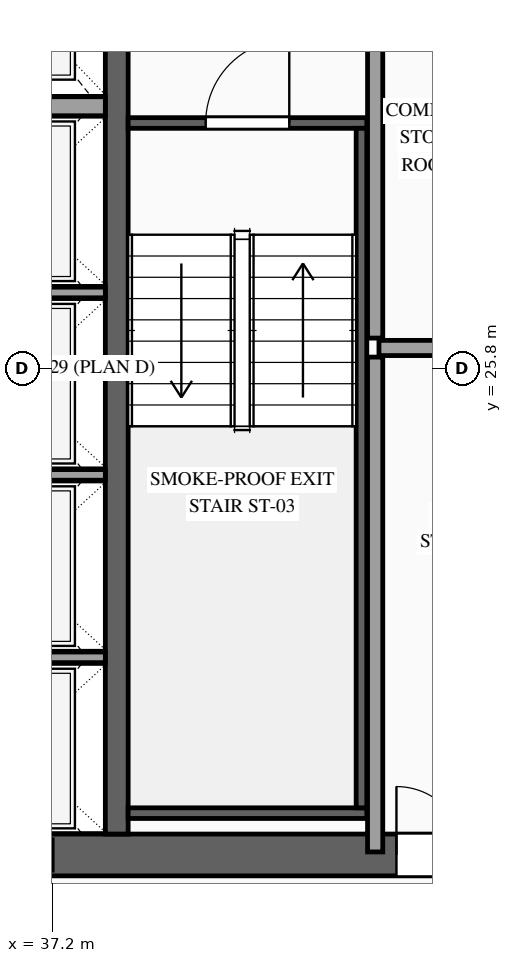
"""IFC4 building model, lengths in metres.
Left out: names, types, materials, properties, quantities, classifications, styles, units other than length and angle.
Written with IfcOpenShell. Run it as: python <this file> out.ifc"""

import sys

from ifc_helpers import new_model, si_unit, direction, frame, frame_2d, origin, place, context, subcontext, project, spatial, rectangle, extrude, source, transform, mapped, element, fill, save


model = new_model("IFC4")
c1 = context("Model", 3, precision=1e-05, world=origin(), true_north=direction((0.0, 1.0)))
c2 = subcontext(c1, "Body", "Model", "MODEL_VIEW")
j1 = project(units=[si_unit("LENGTHUNIT", "METRE"), si_unit("PLANEANGLEUNIT", "RADIAN")], contexts=[c1])
p1 = place(None, origin())
s1 = spatial("IfcSite", under=j1, at=p1, CompositionType="ELEMENT")
p2 = place(p1, origin())
s2 = spatial("IfcBuilding", under=s1, at=p2, CompositionType="ELEMENT")
p3 = place(p2, frame((0.0, 0.0, 241.6)))
s3 = spatial("IfcBuildingStorey", under=s2, at=p3, CompositionType="ELEMENT", Elevation=241.6)
p4 = place(p3, frame((23.525, 19.4, 0.0), z_axis=(0.0, 0.0, 1.0), x_axis=(1.0, 0.0, 0.0)))
e1 = element("IfcWall", 1, at=p4, inside=s3, PredefinedType="SHEAR", context=c2, shape_type="SweptSolid", body=[
    extrude(rectangle(XDim=26.95, YDim=0.55, at=frame_2d((13.475, 0.0))), origin(), (0.0, 0.0, 1.0), 3.5),
])
p5 = place(p4, frame((1.925, 0.0, 0.0)))
e2 = element("IfcOpeningElement", 2, at=p5, cuts=e1, PredefinedType="OPENING", context=c2, shape_type="SweptSolid", body=[
    extrude(rectangle(XDim=1.1, YDim=2.2, at=frame_2d((0.55, 1.1))), frame((0.0, 0.29, 0.0), z_axis=(0.0, -1.0, 0.0), x_axis=(1.0, 0.0, 0.0)), (0.0, 0.0, 1.0), 0.58),
])
p6 = place(p4, frame((9.825, 0.0, 0.0)))
e3 = element("IfcOpeningElement", 3, at=p6, cuts=e1, PredefinedType="OPENING", context=c2, shape_type="SweptSolid", body=[
    extrude(rectangle(XDim=1.1, YDim=2.2, at=frame_2d((0.55, 1.1))), frame((0.0, 0.29, 0.0), z_axis=(0.0, -1.0, 0.0), x_axis=(1.0, 0.0, 0.0)), (0.0, 0.0, 1.0), 0.58),
])
p7 = place(p4, frame((23.025, 0.0, 0.0)))
e4 = element("IfcOpeningElement", 4, at=p7, cuts=e1, PredefinedType="OPENING", context=c2, shape_type="SweptSolid", body=[
    extrude(rectangle(XDim=1.1, YDim=2.2, at=frame_2d((0.55, 1.1))), frame((0.0, 0.29, 0.0), z_axis=(0.0, -1.0, 0.0), x_axis=(1.0, 0.0, 0.0)), (0.0, 0.0, 1.0), 0.58),
])
p8 = place(p4, frame((19.645, 0.0, 0.0)))
e5 = element("IfcOpeningElement", 5, at=p8, cuts=e1, PredefinedType="OPENING", context=c2, shape_type="SweptSolid", body=[
    extrude(rectangle(XDim=0.9, YDim=2.15, at=frame_2d((0.45, 1.075))), frame((0.0, 0.29, 0.0), z_axis=(0.0, -1.0, 0.0), x_axis=(1.0, 0.0, 0.0)), (0.0, 0.0, 1.0), 0.58),
])
p9 = place(p4, frame((18.205, 0.0, 0.0)))
e6 = element("IfcOpeningElement", 6, at=p9, cuts=e1, PredefinedType="OPENING", context=c2, shape_type="SweptSolid", body=[
    extrude(rectangle(XDim=0.9, YDim=2.15, at=frame_2d((0.45, 1.075))), frame((0.0, 0.29, 0.0), z_axis=(0.0, -1.0, 0.0), x_axis=(1.0, 0.0, 0.0)), (0.0, 0.0, 1.0), 0.58),
])
m1 = source(origin(), c2, "Body", "SweptSolid", [
    extrude(rectangle(XDim=12.25, YDim=0.3, at=frame_2d((6.125, 0.0))), origin(), (0.0, 0.0, 1.0), 3.5),
])
p10 = place(p3, frame((38.05, 19.675, 0.0), z_axis=(0.0, 0.0, 1.0), x_axis=(0.0, 1.0, 0.0)))
e7 = element("IfcWall", 7, at=p10, inside=s3, PredefinedType="SOLIDWALL", context=c2, shape_type="MappedRepresentation", body=[
    mapped(m1, transform((0.0, 0.0, 0.0), scale=1.0)),
])
m2 = source(origin(), c2, "Body", "SweptSolid", [
    extrude(rectangle(XDim=2.4, YDim=0.14, at=frame_2d((1.2, 0.0))), origin(), (0.0, 0.0, 1.0), 3.28),
])
for number, where, z_axis, x_axis in (
    (8, (35.5, 22.0, 0.0), (0.0, 0.0, 1.0), (1.0, 0.0, 0.0)),
    (9, (35.5, 24.4, 0.0), (0.0, 0.0, 1.0), (1.0, 0.0, 0.0)),
    (10, (35.5, 26.8, 0.0), (0.0, 0.0, 1.0), (1.0, 0.0, 0.0)),
):
    element("IfcWall", number, at=place(p3, frame(where, z_axis=z_axis, x_axis=x_axis)), inside=s3, PredefinedType="SOLIDWALL", context=c2, shape_type="MappedRepresentation", body=[
        mapped(m2, transform((0.0, 0.0, 0.0), scale=1.0)),
    ])
m3 = source(origin(), c2, "Body", "SweptSolid", [
    extrude(rectangle(XDim=2.4, YDim=0.25, at=frame_2d((1.2, 0.0))), origin(), (0.0, 0.0, 1.0), 3.28),
])
p11 = place(p3, frame((35.5, 29.25, 0.0), z_axis=(0.0, 0.0, 1.0), x_axis=(1.0, 0.0, 0.0)))
e11 = element("IfcWall", 11, at=p11, inside=s3, PredefinedType="SOLIDWALL", context=c2, shape_type="MappedRepresentation", body=[
    mapped(m3, transform((0.0, 0.0, 0.0), scale=1.0)),
])
p12 = place(p3, frame((38.2, 29.03, 0.0), z_axis=(0.0, 0.0, 1.0), x_axis=(1.0, 0.0, 0.0)))
e12 = element("IfcWall", 12, at=p12, inside=s3, PredefinedType="SOLIDWALL", context=c2, shape_type="SweptSolid", body=[
    extrude(rectangle(XDim=3.14, YDim=0.14, at=frame_2d((1.57, 0.0))), origin(), (0.0, 0.0, 1.0), 3.28),
])
p13 = place(p12, frame((1.02, 0.0, 0.0)))
e13 = element("IfcOpeningElement", 13, at=p13, cuts=e12, PredefinedType="OPENING", context=c2, shape_type="SweptSolid", body=[
    extrude(rectangle(XDim=1.1, YDim=2.2, at=frame_2d((0.55, 1.1))), frame((0.0, 0.085, 0.0), z_axis=(0.0, -1.0, 0.0), x_axis=(1.0, 0.0, 0.0)), (0.0, 0.0, 1.0), 0.17),
])
m4 = source(origin(), c2, "Body", "SweptSolid", [
    extrude(rectangle(XDim=3.14, YDim=0.14, at=frame_2d((1.57, 0.0))), origin(), (0.0, 0.0, 1.0), 3.28),
])
p14 = place(p3, frame((38.2, 19.95, 0.0), z_axis=(0.0, 0.0, 1.0), x_axis=(1.0, 0.0, 0.0)))
e14 = element("IfcWall", 14, at=p14, inside=s3, PredefinedType="SOLIDWALL", context=c2, shape_type="MappedRepresentation", body=[
    mapped(m4, transform((0.0, 0.0, 0.0), scale=1.0)),
])
m5 = source(origin(), c2, "Body", "SweptSolid", [
    extrude(rectangle(XDim=8.94, YDim=0.14, at=frame_2d((4.47, 0.0))), origin(), (0.0, 0.0, 1.0), 3.28),
])
p15 = place(p3, frame((41.27, 20.02, 0.0), z_axis=(0.0, 0.0, 1.0), x_axis=(0.0, 1.0, 0.0)))
e15 = element("IfcWall", 15, at=p15, inside=s3, PredefinedType="SOLIDWALL", context=c2, shape_type="MappedRepresentation", body=[
    mapped(m5, transform((0.0, 0.0, 0.0), scale=1.0)),
])
m6 = source(origin(), c2, "Body", "SweptSolid", [
    extrude(rectangle(XDim=6.51, YDim=0.2, at=frame_2d((3.255, 0.0))), origin(), (0.0, 0.0, 1.0), 3.28),
])
p16 = place(p3, frame((41.45, 19.44, 0.0), z_axis=(0.0, 0.0, 1.0), x_axis=(0.0, 1.0, 0.0)))
e16 = element("IfcWall", 16, at=p16, inside=s3, PredefinedType="PARTITIONING", context=c2, shape_type="MappedRepresentation", body=[
    mapped(m6, transform((0.0, 0.0, 0.0), scale=1.0)),
])
m7 = source(origin(), c2, "Body", "SweptSolid", [
    extrude(rectangle(XDim=2.7, YDim=0.2, at=frame_2d((1.35, 0.0))), origin(), (0.0, 0.0, 1.0), 3.28),
])
p17 = place(p3, frame((41.5, 26.07, 0.0), z_axis=(0.0, 0.0, 1.0), x_axis=(1.0, 0.0, 0.0)))
e17 = element("IfcWall", 17, at=p17, inside=s3, PredefinedType="PARTITIONING", context=c2, shape_type="MappedRepresentation", body=[
    mapped(m7, transform((0.0, 0.0, 0.0), scale=1.0)),
])
m8 = source(origin(), c2, "Body", "SweptSolid", [
    extrude(rectangle(XDim=5.96, YDim=0.2, at=frame_2d((2.98, 0.0))), origin(), (0.0, 0.0, 1.0), 3.28),
])
p18 = place(p3, frame((41.45, 26.2, 0.0), z_axis=(0.0, 0.0, 1.0), x_axis=(0.0, 1.0, 0.0)))
e18 = element("IfcWall", 18, at=p18, inside=s3, PredefinedType="PARTITIONING", context=c2, shape_type="MappedRepresentation", body=[
    mapped(m8, transform((0.0, 0.0, 0.0), scale=1.0)),
])
m9 = source(origin(), c2, "Body", "SweptSolid", [
    extrude(rectangle(XDim=1.1, YDim=2.2, at=frame_2d((0.55, 1.1))), frame((0.0, 0.025, 0.0), z_axis=(0.0, -1.0, 0.0), x_axis=(1.0, 0.0, 0.0)), (0.0, 0.0, 1.0), 0.05),
])
p19 = place(p13, origin())
e19 = element("IfcDoor", 19, at=p19, inside=s3, OperationType="SINGLE_SWING_RIGHT", PredefinedType="DOOR", context=c2, shape_type="MappedRepresentation", body=[
    mapped(m9, transform((0.0, 0.0, 0.0), scale=1.0)),
])
fill(e13, e19)
m10 = source(origin(), c2, "Body", "SweptSolid", [
    extrude(rectangle(XDim=0.9, YDim=2.15, at=frame_2d((0.45, 1.075))), frame((0.0, 0.025, 0.0), z_axis=(0.0, -1.0, 0.0), x_axis=(1.0, 0.0, 0.0)), (0.0, 0.0, 1.0), 0.05),
])
p20 = place(p9, origin())
e20 = element("IfcDoor", 20, at=p20, inside=s3, OperationType="SINGLE_SWING_LEFT", PredefinedType="DOOR", context=c2, shape_type="MappedRepresentation", body=[
    mapped(m10, transform((0.0, 0.0, 0.0), scale=1.0)),
])
fill(e6, e20)
save(model, sys.argv[1])
